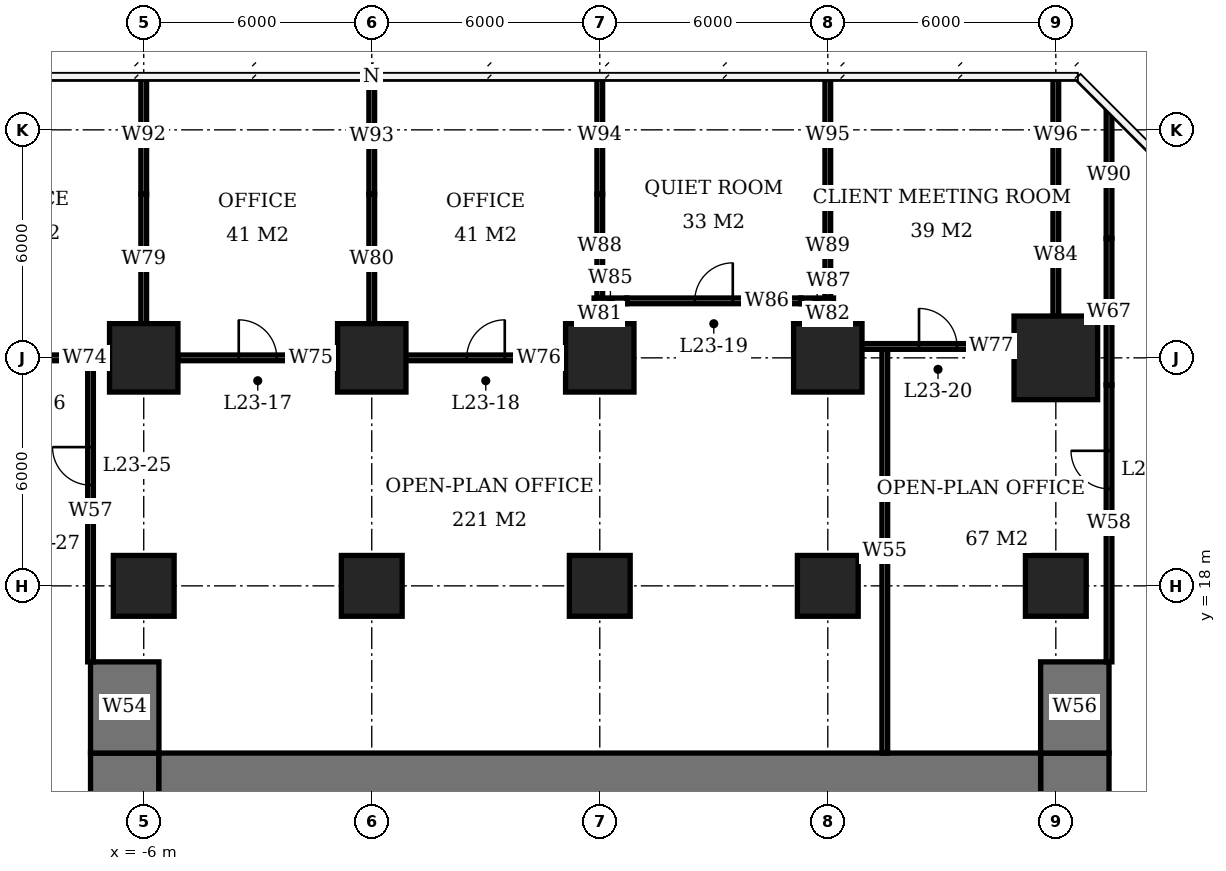
"""IFC4 building model, lengths in metres.
Left out: names, types, materials, properties, quantities, classifications, styles, units other than length and angle.
Written with IfcOpenShell. Run it as: python <this file> out.ifc"""

import sys

from ifc_helpers import new_model, si_unit, direction, frame, frame_2d, origin, origin_2d, place, context, subcontext, project, spatial, rectangle, extrude, element, fill, save


model = new_model("IFC4")
c1 = context("Model", 3, precision=1e-05, world=origin(), true_north=direction((0.0, 1.0)))
c2 = subcontext(c1, "Body", "Model", "MODEL_VIEW")
j1 = project(units=[si_unit("LENGTHUNIT", "METRE"), si_unit("PLANEANGLEUNIT", "RADIAN")], contexts=[c1])
p1 = place(None, origin())
s1 = spatial("IfcSite", under=j1, at=p1, CompositionType="ELEMENT")
p2 = place(p1, origin())
s2 = spatial("IfcBuilding", under=s1, at=p2, CompositionType="ELEMENT")
p3 = place(p2, frame((0.0, 0.0, 97.7)))
s3 = spatial("IfcBuildingStorey", under=s2, at=p3, CompositionType="ELEMENT", Elevation=97.7)
p4 = place(p3, frame((-6.0, 18.0, 0.0), z_axis=(0.0, 0.0, 1.0), x_axis=(1.0, 0.0, 0.0)))
e1 = element("IfcColumn", 1, at=p4, inside=s3, PredefinedType="COLUMN", context=c2, shape_type="SweptSolid", body=[
    extrude(rectangle(XDim=1.6, YDim=1.6, at=origin_2d()), origin(), (0.0, 0.0, 1.0), 3.9),
])
p5 = place(p3, frame((-6.0, 24.0, 0.0), z_axis=(0.0, 0.0, 1.0), x_axis=(1.0, 0.0, 0.0)))
e2 = element("IfcColumn", 2, at=p5, inside=s3, PredefinedType="COLUMN", context=c2, shape_type="SweptSolid", body=[
    extrude(rectangle(XDim=1.8, YDim=1.8, at=origin_2d()), origin(), (0.0, 0.0, 1.0), 3.9),
])
p6 = place(p3, frame((0.0, 18.0, 0.0), z_axis=(0.0, 0.0, 1.0), x_axis=(1.0, 0.0, 0.0)))
e3 = element("IfcColumn", 3, at=p6, inside=s3, PredefinedType="COLUMN", context=c2, shape_type="SweptSolid", body=[
    extrude(rectangle(XDim=1.6, YDim=1.6, at=origin_2d()), origin(), (0.0, 0.0, 1.0), 3.9),
])
p7 = place(p3, frame((0.0, 24.0, 0.0), z_axis=(0.0, 0.0, 1.0), x_axis=(1.0, 0.0, 0.0)))
e4 = element("IfcColumn", 4, at=p7, inside=s3, PredefinedType="COLUMN", context=c2, shape_type="SweptSolid", body=[
    extrude(rectangle(XDim=1.8, YDim=1.8, at=origin_2d()), origin(), (0.0, 0.0, 1.0), 3.9),
])
p8 = place(p3, frame((6.0, 18.0, 0.0), z_axis=(0.0, 0.0, 1.0), x_axis=(1.0, 0.0, 0.0)))
e5 = element("IfcColumn", 5, at=p8, inside=s3, PredefinedType="COLUMN", context=c2, shape_type="SweptSolid", body=[
    extrude(rectangle(XDim=1.6, YDim=1.6, at=origin_2d()), origin(), (0.0, 0.0, 1.0), 3.9),
])
p9 = place(p3, frame((6.0, 24.0, 0.0), z_axis=(0.0, 0.0, 1.0), x_axis=(1.0, 0.0, 0.0)))
e6 = element("IfcColumn", 6, at=p9, inside=s3, PredefinedType="COLUMN", context=c2, shape_type="SweptSolid", body=[
    extrude(rectangle(XDim=1.8, YDim=1.8, at=origin_2d()), origin(), (0.0, 0.0, 1.0), 3.9),
])
p10 = place(p3, frame((12.0, 18.0, 0.0), z_axis=(0.0, 0.0, 1.0), x_axis=(1.0, 0.0, 0.0)))
e7 = element("IfcColumn", 7, at=p10, inside=s3, PredefinedType="COLUMN", context=c2, shape_type="SweptSolid", body=[
    extrude(rectangle(XDim=1.6, YDim=1.6, at=origin_2d()), origin(), (0.0, 0.0, 1.0), 3.9),
])
p11 = place(p3, frame((12.0, 24.0, 0.0), z_axis=(0.0, 0.0, 1.0), x_axis=(1.0, 0.0, 0.0)))
e8 = element("IfcColumn", 8, at=p11, inside=s3, PredefinedType="COLUMN", context=c2, shape_type="SweptSolid", body=[
    extrude(rectangle(XDim=1.8, YDim=1.8, at=origin_2d()), origin(), (0.0, 0.0, 1.0), 3.9),
])
p12 = place(p3, frame((18.0, 18.0, 0.0), z_axis=(0.0, 0.0, 1.0), x_axis=(1.0, 0.0, 0.0)))
e9 = element("IfcColumn", 9, at=p12, inside=s3, PredefinedType="COLUMN", context=c2, shape_type="SweptSolid", body=[
    extrude(rectangle(XDim=1.6, YDim=1.6, at=origin_2d()), origin(), (0.0, 0.0, 1.0), 3.9),
])
p13 = place(p3, frame((18.0, 24.0, 0.0), z_axis=(0.0, 0.0, 1.0), x_axis=(1.0, 0.0, 0.0)))
e10 = element("IfcColumn", 10, at=p13, inside=s3, PredefinedType="COLUMN", context=c2, shape_type="SweptSolid", body=[
    extrude(rectangle(XDim=2.2, YDim=2.2, at=origin_2d()), origin(), (0.0, 0.0, 1.0), 3.9),
])
p14 = place(p3, frame((-5.6, 12.6, 0.0), z_axis=(0.0, 0.0, 1.0), x_axis=(1.0, 0.0, 0.0)))
e11 = element("IfcWall", 11, at=p14, inside=s3, PredefinedType="SHEAR", context=c2, shape_type="SweptSolid", body=[
    extrude(rectangle(XDim=23.2, YDim=2.0, at=frame_2d((11.6, 0.0))), origin(), (0.0, 0.0, 1.0), 3.9),
])
p15 = place(p3, frame((-6.5, -7.6, 0.0), z_axis=(0.0, 0.0, 1.0), x_axis=(0.0, 1.0, 0.0)))
e12 = element("IfcWall", 12, at=p15, inside=s3, PredefinedType="SHEAR", context=c2, shape_type="SweptSolid", body=[
    extrude(rectangle(XDim=21.2, YDim=1.8, at=frame_2d((10.6, 0.0))), origin(), (0.0, 0.0, 1.0), 3.9),
])
p16 = place(p15, frame((7.8, 0.0, 0.0)))
e13 = element("IfcOpeningElement", 13, at=p16, cuts=e12, PredefinedType="OPENING", context=c2, shape_type="SweptSolid", body=[
    extrude(rectangle(XDim=1.8, YDim=2.4, at=frame_2d((0.9, 1.2))), frame((0.0, 0.91, 0.0), z_axis=(0.0, -1.0, 0.0), x_axis=(1.0, 0.0, 0.0)), (0.0, 0.0, 1.0), 1.82),
])
p17 = place(p3, frame((18.5, -7.6, 0.0), z_axis=(0.0, 0.0, 1.0), x_axis=(0.0, 1.0, 0.0)))
e14 = element("IfcWall", 14, at=p17, inside=s3, PredefinedType="SHEAR", context=c2, shape_type="SweptSolid", body=[
    extrude(rectangle(XDim=21.2, YDim=1.8, at=frame_2d((10.6, 0.0))), origin(), (0.0, 0.0, 1.0), 3.9),
])
p18 = place(p17, frame((9.2, 0.0, 0.0)))
e15 = element("IfcOpeningElement", 15, at=p18, cuts=e14, PredefinedType="OPENING", context=c2, shape_type="SweptSolid", body=[
    extrude(rectangle(XDim=1.8, YDim=2.4, at=frame_2d((0.9, 1.2))), frame((0.0, 0.91, 0.0), z_axis=(0.0, -1.0, 0.0), x_axis=(1.0, 0.0, 0.0)), (0.0, 0.0, 1.0), 1.82),
])
for number, where, z_axis, x_axis in (
    (16, (-6.5, 13.6, 0.0), (0.0, 0.0, 1.0), (0.0, 1.0, 0.0)),
    (17, (18.5, 13.6, 0.0), (0.0, 0.0, 1.0), (0.0, 1.0, 0.0)),
):
    element("IfcWall", number, at=place(p3, frame(where, z_axis=z_axis, x_axis=x_axis)), inside=s3, PredefinedType="SHEAR", context=c2, shape_type="SweptSolid", body=[
        extrude(rectangle(XDim=2.4, YDim=1.8, at=frame_2d((1.2, 0.0))), origin(), (0.0, 0.0, 1.0), 3.9),
    ])
p19 = place(p3, frame((-11.0, 24.0, 0.0), z_axis=(0.0, 0.0, 1.0), x_axis=(1.0, 0.0, 0.0)))
e18 = element("IfcWall", 18, at=p19, inside=s3, PredefinedType="PARTITIONING", context=c2, shape_type="SweptSolid", body=[
    extrude(rectangle(XDim=4.1, YDim=0.15, at=frame_2d((2.05, 0.0))), origin(), (0.0, 0.0, 1.0), 3.65),
])
p20 = place(p19, frame((1.55, 0.0, 0.0)))
e19 = element("IfcOpeningElement", 19, at=p20, cuts=e18, PredefinedType="OPENING", context=c2, shape_type="SweptSolid", body=[
    extrude(rectangle(XDim=1.0, YDim=2.1, at=frame_2d((0.5, 1.05))), frame((0.0, 0.085, 0.0), z_axis=(0.0, -1.0, 0.0), x_axis=(1.0, 0.0, 0.0)), (0.0, 0.0, 1.0), 0.17),
])
p21 = place(p3, frame((-5.1, 24.0, 0.0), z_axis=(0.0, 0.0, 1.0), x_axis=(1.0, 0.0, 0.0)))
e20 = element("IfcWall", 20, at=p21, inside=s3, PredefinedType="PARTITIONING", context=c2, shape_type="SweptSolid", body=[
    extrude(rectangle(XDim=4.2, YDim=0.15, at=frame_2d((2.1, 0.0))), origin(), (0.0, 0.0, 1.0), 3.65),
])
p22 = place(p21, frame((1.6, 0.0, 0.0)))
e21 = element("IfcOpeningElement", 21, at=p22, cuts=e20, PredefinedType="OPENING", context=c2, shape_type="SweptSolid", body=[
    extrude(rectangle(XDim=1.0, YDim=2.1, at=frame_2d((0.5, 1.05))), frame((0.0, 0.085, 0.0), z_axis=(0.0, -1.0, 0.0), x_axis=(1.0, 0.0, 0.0)), (0.0, 0.0, 1.0), 0.17),
])
p23 = place(p3, frame((0.9, 24.0, 0.0), z_axis=(0.0, 0.0, 1.0), x_axis=(1.0, 0.0, 0.0)))
e22 = element("IfcWall", 22, at=p23, inside=s3, PredefinedType="PARTITIONING", context=c2, shape_type="SweptSolid", body=[
    extrude(rectangle(XDim=4.2, YDim=0.15, at=frame_2d((2.1, 0.0))), origin(), (0.0, 0.0, 1.0), 3.65),
])
p24 = place(p23, frame((1.6, 0.0, 0.0)))
e23 = element("IfcOpeningElement", 23, at=p24, cuts=e22, PredefinedType="OPENING", context=c2, shape_type="SweptSolid", body=[
    extrude(rectangle(XDim=1.0, YDim=2.1, at=frame_2d((0.5, 1.05))), frame((0.0, 0.085, 0.0), z_axis=(0.0, -1.0, 0.0), x_axis=(1.0, 0.0, 0.0)), (0.0, 0.0, 1.0), 0.17),
])
p25 = place(p3, frame((12.9, 24.3, 0.0), z_axis=(0.0, 0.0, 1.0), x_axis=(1.0, 0.0, 0.0)))
e24 = element("IfcWall", 24, at=p25, inside=s3, PredefinedType="PARTITIONING", context=c2, shape_type="SweptSolid", body=[
    extrude(rectangle(XDim=4.0, YDim=0.15, at=frame_2d((2.0, 0.0))), origin(), (0.0, 0.0, 1.0), 3.65),
])
p26 = place(p25, frame((1.5, 0.0, 0.0)))
e25 = element("IfcOpeningElement", 25, at=p26, cuts=e24, PredefinedType="OPENING", context=c2, shape_type="SweptSolid", body=[
    extrude(rectangle(XDim=1.0, YDim=2.1, at=frame_2d((0.5, 1.05))), frame((0.0, 0.085, 0.0), z_axis=(0.0, -1.0, 0.0), x_axis=(1.0, 0.0, 0.0)), (0.0, 0.0, 1.0), 0.17),
])
p27 = place(p3, frame((5.85, 25.5, 0.0), z_axis=(0.0, 0.0, 1.0), x_axis=(1.0, 0.0, 0.0)))
e26 = element("IfcWall", 26, at=p27, inside=s3, PredefinedType="PARTITIONING", context=c2, shape_type="SweptSolid", body=[
    extrude(rectangle(XDim=0.86, YDim=0.15, at=frame_2d((0.43, 0.0))), origin(), (0.0, 0.0, 1.0), 2.65),
])
p28 = place(p3, frame((6.71, 25.5, 0.0), z_axis=(0.0, 0.0, 1.0), x_axis=(1.0, 0.0, 0.0)))
e27 = element("IfcWall", 27, at=p28, inside=s3, PredefinedType="PARTITIONING", context=c2, shape_type="SweptSolid", body=[
    extrude(rectangle(XDim=4.58, YDim=0.15, at=frame_2d((2.29, 0.0))), origin(), (0.0, 0.0, 1.0), 3.65),
])
p29 = place(p28, frame((1.79, 0.0, 0.0)))
e28 = element("IfcOpeningElement", 28, at=p29, cuts=e27, PredefinedType="OPENING", context=c2, shape_type="SweptSolid", body=[
    extrude(rectangle(XDim=1.0, YDim=2.1, at=frame_2d((0.5, 1.05))), frame((0.0, 0.085, 0.0), z_axis=(0.0, -1.0, 0.0), x_axis=(1.0, 0.0, 0.0)), (0.0, 0.0, 1.0), 0.17),
])
p30 = place(p3, frame((11.29, 25.5, 0.0), z_axis=(0.0, 0.0, 1.0), x_axis=(1.0, 0.0, 0.0)))
e29 = element("IfcWall", 29, at=p30, inside=s3, PredefinedType="PARTITIONING", context=c2, shape_type="SweptSolid", body=[
    extrude(rectangle(XDim=0.86, YDim=0.15, at=frame_2d((0.43, 0.0))), origin(), (0.0, 0.0, 1.0), 2.65),
])
p31 = place(p3, frame((-6.0, 24.9, 0.0), z_axis=(0.0, 0.0, 1.0), x_axis=(0.0, 1.0, 0.0)))
e30 = element("IfcWall", 30, at=p31, inside=s3, PredefinedType="PARTITIONING", context=c2, shape_type="SweptSolid", body=[
    extrude(rectangle(XDim=3.41, YDim=0.15, at=frame_2d((1.705, 0.0))), origin(), (0.0, 0.0, 1.0), 2.65),
])
p32 = place(p3, frame((-6.0, 28.31, 0.0), z_axis=(0.0, 0.0, 1.0), x_axis=(0.0, 1.0, 0.0)))
e31 = element("IfcWall", 31, at=p32, inside=s3, PredefinedType="PARTITIONING", context=c2, shape_type="SweptSolid", body=[
    extrude(rectangle(XDim=3.09, YDim=0.15, at=frame_2d((1.545, 0.0))), origin(), (0.0, 0.0, 1.0), 3.65),
])
p33 = place(p3, frame((0.0, 24.9, 0.0), z_axis=(0.0, 0.0, 1.0), x_axis=(0.0, 1.0, 0.0)))
e32 = element("IfcWall", 32, at=p33, inside=s3, PredefinedType="PARTITIONING", context=c2, shape_type="SweptSolid", body=[
    extrude(rectangle(XDim=3.41, YDim=0.15, at=frame_2d((1.705, 0.0))), origin(), (0.0, 0.0, 1.0), 2.65),
])
p34 = place(p3, frame((0.0, 28.31, 0.0), z_axis=(0.0, 0.0, 1.0), x_axis=(0.0, 1.0, 0.0)))
e33 = element("IfcWall", 33, at=p34, inside=s3, PredefinedType="PARTITIONING", context=c2, shape_type="SweptSolid", body=[
    extrude(rectangle(XDim=3.04, YDim=0.15, at=frame_2d((1.52, 0.0))), origin(), (0.0, 0.0, 1.0), 3.65),
])
p35 = place(p3, frame((6.0, 24.9, 0.0), z_axis=(0.0, 0.0, 1.0), x_axis=(0.0, 1.0, 0.0)))
e34 = element("IfcWall", 34, at=p35, inside=s3, PredefinedType="PARTITIONING", context=c2, shape_type="SweptSolid", body=[
    extrude(rectangle(XDim=0.525, YDim=0.15, at=frame_2d((0.263, 0.0))), origin(), (0.0, 0.0, 1.0), 2.65),
])
p36 = place(p3, frame((6.0, 25.575, 0.0), z_axis=(0.0, 0.0, 1.0), x_axis=(0.0, 1.0, 0.0)))
e35 = element("IfcWall", 35, at=p36, inside=s3, PredefinedType="PARTITIONING", context=c2, shape_type="SweptSolid", body=[
    extrude(rectangle(XDim=2.735, YDim=0.15, at=frame_2d((1.368, 0.0))), origin(), (0.0, 0.0, 1.0), 2.65),
])
p37 = place(p3, frame((6.0, 28.31, 0.0), z_axis=(0.0, 0.0, 1.0), x_axis=(0.0, 1.0, 0.0)))
e36 = element("IfcWall", 36, at=p37, inside=s3, PredefinedType="PARTITIONING", context=c2, shape_type="SweptSolid", body=[
    extrude(rectangle(XDim=3.09, YDim=0.15, at=frame_2d((1.545, 0.0))), origin(), (0.0, 0.0, 1.0), 3.65),
])
p38 = place(p3, frame((12.0, 24.9, 0.0), z_axis=(0.0, 0.0, 1.0), x_axis=(0.0, 1.0, 0.0)))
e37 = element("IfcWall", 37, at=p38, inside=s3, PredefinedType="PARTITIONING", context=c2, shape_type="SweptSolid", body=[
    extrude(rectangle(XDim=0.525, YDim=0.15, at=frame_2d((0.263, 0.0))), origin(), (0.0, 0.0, 1.0), 2.65),
])
p39 = place(p3, frame((12.0, 25.575, 0.0), z_axis=(0.0, 0.0, 1.0), x_axis=(0.0, 1.0, 0.0)))
e38 = element("IfcWall", 38, at=p39, inside=s3, PredefinedType="PARTITIONING", context=c2, shape_type="SweptSolid", body=[
    extrude(rectangle(XDim=2.735, YDim=0.15, at=frame_2d((1.368, 0.0))), origin(), (0.0, 0.0, 1.0), 2.65),
])
p40 = place(p3, frame((12.0, 28.31, 0.0), z_axis=(0.0, 0.0, 1.0), x_axis=(0.0, 1.0, 0.0)))
e39 = element("IfcWall", 39, at=p40, inside=s3, PredefinedType="PARTITIONING", context=c2, shape_type="SweptSolid", body=[
    extrude(rectangle(XDim=3.09, YDim=0.15, at=frame_2d((1.545, 0.0))), origin(), (0.0, 0.0, 1.0), 3.65),
])
p41 = place(p3, frame((18.0, 25.1, 0.0), z_axis=(0.0, 0.0, 1.0), x_axis=(0.0, 1.0, 0.0)))
e40 = element("IfcWall", 40, at=p41, inside=s3, PredefinedType="PARTITIONING", context=c2, shape_type="SweptSolid", body=[
    extrude(rectangle(XDim=3.21, YDim=0.15, at=frame_2d((1.605, 0.0))), origin(), (0.0, 0.0, 1.0), 2.65),
])
p42 = place(p3, frame((18.0, 28.31, 0.0), z_axis=(0.0, 0.0, 1.0), x_axis=(0.0, 1.0, 0.0)))
e41 = element("IfcWall", 41, at=p42, inside=s3, PredefinedType="PARTITIONING", context=c2, shape_type="SweptSolid", body=[
    extrude(rectangle(XDim=3.09, YDim=0.15, at=frame_2d((1.545, 0.0))), origin(), (0.0, 0.0, 1.0), 3.65),
])
p43 = place(p3, frame((-7.4, 16.0, 0.0), z_axis=(0.0, 0.0, 1.0), x_axis=(0.0, 1.0, 0.0)))
e42 = element("IfcWall", 42, at=p43, inside=s3, PredefinedType="PARTITIONING", context=c2, shape_type="SweptSolid", body=[
    extrude(rectangle(XDim=7.925, YDim=0.15, at=frame_2d((3.962, 0.0))), origin(), (0.0, 0.0, 1.0), 3.65),
])
p44 = place(p43, frame((4.651, 0.0, 0.0)))
e43 = element("IfcOpeningElement", 43, at=p44, cuts=e42, PredefinedType="OPENING", context=c2, shape_type="SweptSolid", body=[
    extrude(rectangle(XDim=1.0, YDim=2.1, at=frame_2d((0.5, 1.05))), frame((0.0, 0.085, 0.0), z_axis=(0.0, -1.0, 0.0), x_axis=(1.0, 0.0, 0.0)), (0.0, 0.0, 1.0), 0.17),
])
p45 = place(p3, frame((13.5, 13.6, 0.0), z_axis=(0.0, 0.0, 1.0), x_axis=(0.0, 1.0, 0.0)))
e44 = element("IfcWall", 44, at=p45, inside=s3, PredefinedType="PARTITIONING", context=c2, shape_type="SweptSolid", body=[
    extrude(rectangle(XDim=10.625, YDim=0.15, at=frame_2d((5.312, 0.0))), origin(), (0.0, 0.0, 1.0), 3.65),
])
p46 = place(p3, frame((19.4, 16.0, 0.0), z_axis=(0.0, 0.0, 1.0), x_axis=(0.0, 1.0, 0.0)))
e45 = element("IfcWall", 45, at=p46, inside=s3, PredefinedType="PARTITIONING", context=c2, shape_type="SweptSolid", body=[
    extrude(rectangle(XDim=7.29, YDim=0.15, at=frame_2d((3.645, 0.0))), origin(), (0.0, 0.0, 1.0), 3.65),
])
p47 = place(p46, frame((4.554, 0.0, 0.0)))
e46 = element("IfcOpeningElement", 46, at=p47, cuts=e45, PredefinedType="OPENING", context=c2, shape_type="SweptSolid", body=[
    extrude(rectangle(XDim=1.0, YDim=2.1, at=frame_2d((0.5, 1.05))), frame((0.0, 0.085, 0.0), z_axis=(0.0, -1.0, 0.0), x_axis=(1.0, 0.0, 0.0)), (0.0, 0.0, 1.0), 0.17),
])
p48 = place(p3, frame((19.4, 23.29, 0.0), z_axis=(0.0, 0.0, 1.0), x_axis=(0.0, 1.0, 0.0)))
e47 = element("IfcWall", 47, at=p48, inside=s3, PredefinedType="PARTITIONING", context=c2, shape_type="SweptSolid", body=[
    extrude(rectangle(XDim=3.85, YDim=0.15, at=frame_2d((1.925, 0.0))), origin(), (0.0, 0.0, 1.0), 2.65),
])
p49 = place(p3, frame((19.4, 27.14, 0.0), z_axis=(0.0, 0.0, 1.0), x_axis=(0.0, 1.0, 0.0)))
e48 = element("IfcWall", 48, at=p49, inside=s3, PredefinedType="PARTITIONING", context=c2, shape_type="SweptSolid", body=[
    extrude(rectangle(XDim=3.349, YDim=0.15, at=frame_2d((1.675, 0.0))), origin(), (0.0, 0.0, 1.0), 3.65),
])
p50 = place(p22, origin())
e49 = element("IfcDoor", 49, at=p50, inside=s3, OperationType="SINGLE_SWING_LEFT", PredefinedType="DOOR", context=c2, shape_type="SweptSolid", body=[
    extrude(rectangle(XDim=1.0, YDim=2.1, at=frame_2d((0.5, 1.05))), frame((0.0, 0.025, 0.0), z_axis=(0.0, -1.0, 0.0), x_axis=(1.0, 0.0, 0.0)), (0.0, 0.0, 1.0), 0.05),
])
fill(e21, e49)
p51 = place(p24, origin())
e50 = element("IfcDoor", 50, at=p51, inside=s3, OperationType="SINGLE_SWING_RIGHT", PredefinedType="DOOR", context=c2, shape_type="SweptSolid", body=[
    extrude(rectangle(XDim=1.0, YDim=2.1, at=frame_2d((0.5, 1.05))), frame((0.0, 0.025, 0.0), z_axis=(0.0, -1.0, 0.0), x_axis=(1.0, 0.0, 0.0)), (0.0, 0.0, 1.0), 0.05),
])
fill(e23, e50)
p52 = place(p29, origin())
e51 = element("IfcDoor", 51, at=p52, inside=s3, OperationType="SINGLE_SWING_RIGHT", PredefinedType="DOOR", context=c2, shape_type="SweptSolid", body=[
    extrude(rectangle(XDim=1.0, YDim=2.1, at=frame_2d((0.5, 1.05))), frame((0.0, 0.025, 0.0), z_axis=(0.0, -1.0, 0.0), x_axis=(1.0, 0.0, 0.0)), (0.0, 0.0, 1.0), 0.05),
])
fill(e28, e51)
p53 = place(p26, origin())
e52 = element("IfcDoor", 52, at=p53, inside=s3, OperationType="SINGLE_SWING_LEFT", PredefinedType="DOOR", context=c2, shape_type="SweptSolid", body=[
    extrude(rectangle(XDim=1.0, YDim=2.1, at=frame_2d((0.5, 1.05))), frame((0.0, 0.025, 0.0), z_axis=(0.0, -1.0, 0.0), x_axis=(1.0, 0.0, 0.0)), (0.0, 0.0, 1.0), 0.05),
])
fill(e25, e52)
p54 = place(p44, origin())
e53 = element("IfcDoor", 53, at=p54, inside=s3, OperationType="SINGLE_SWING_RIGHT", PredefinedType="DOOR", context=c2, shape_type="SweptSolid", body=[
    extrude(rectangle(XDim=1.0, YDim=2.1, at=frame_2d((0.5, 1.05))), frame((0.0, 0.025, 0.0), z_axis=(0.0, -1.0, 0.0), x_axis=(1.0, 0.0, 0.0)), (0.0, 0.0, 1.0), 0.05),
])
fill(e43, e53)
p55 = place(p47, origin())
e54 = element("IfcDoor", 54, at=p55, inside=s3, OperationType="SINGLE_SWING_RIGHT", PredefinedType="DOOR", context=c2, shape_type="SweptSolid", body=[
    extrude(rectangle(XDim=1.0, YDim=2.1, at=frame_2d((0.5, 1.05))), frame((0.0, 0.025, 0.0), z_axis=(0.0, -1.0, 0.0), x_axis=(1.0, 0.0, 0.0)), (0.0, 0.0, 1.0), 0.05),
])
fill(e46, e54)
save(model, sys.argv[1])
